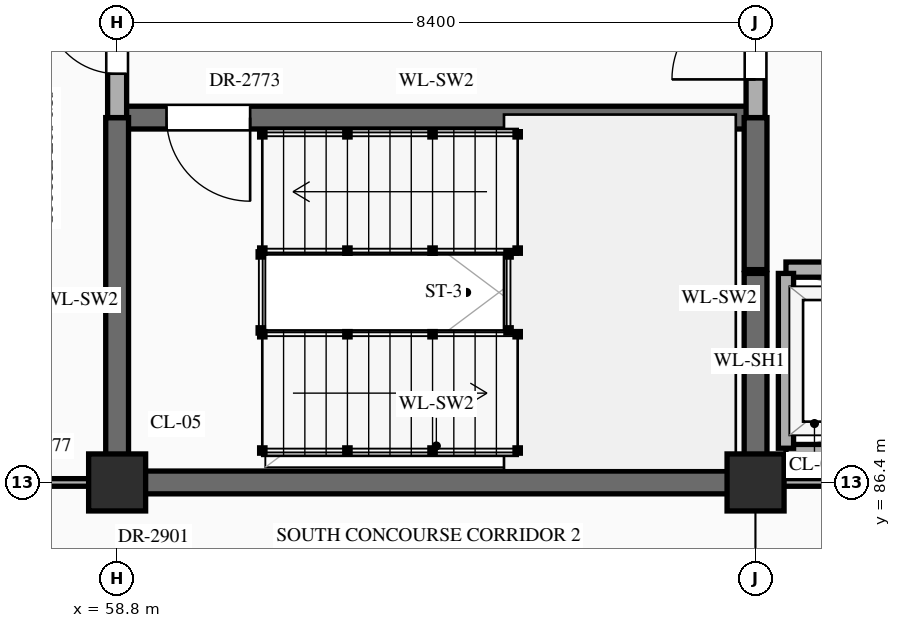
"""IFC4 building model, lengths in metres.
Left out: names, types, materials, properties, quantities, classifications, styles, units other than length and angle.
Written with IfcOpenShell. Run it as: python <this file> out.ifc"""

import sys

from ifc_helpers import new_model, si_unit, direction, frame, frame_2d, origin, origin_2d, place, context, subcontext, project, spatial, rectangle, extrude, element, fill, save


model = new_model("IFC4")
c1 = context("Model", 3, precision=1e-05, world=origin(), true_north=direction((0.0, 1.0)))
c2 = subcontext(c1, "Body", "Model", "MODEL_VIEW")
j1 = project(units=[si_unit("LENGTHUNIT", "METRE"), si_unit("PLANEANGLEUNIT", "RADIAN")], contexts=[c1])
p1 = place(None, origin())
s1 = spatial("IfcSite", under=j1, at=p1, CompositionType="ELEMENT")
p2 = place(p1, origin())
s2 = spatial("IfcBuilding", under=s1, at=p2, CompositionType="ELEMENT")
p3 = place(p2, frame((0.0, 0.0, 43.5)))
s3 = spatial("IfcBuildingStorey", under=s2, at=p3, CompositionType="ELEMENT", Elevation=43.5)
for number, where, z_axis, x_axis in (
    (1, (58.8, 86.4, 0.0), (0.0, 0.0, 1.0), (1.0, 0.0, 0.0)),
    (2, (67.2, 86.4, 0.0), (0.0, 0.0, 1.0), (1.0, 0.0, 0.0)),
):
    element("IfcColumn", number, at=place(p3, frame(where, z_axis=z_axis, x_axis=x_axis)), inside=s3, PredefinedType="COLUMN", context=c2, shape_type="SweptSolid", body=[
        extrude(rectangle(XDim=0.75, YDim=0.75, at=origin_2d()), origin(), (0.0, 0.0, 1.0), 4.2),
    ])
p4 = place(p3, frame((50.4, 86.4, 0.0), z_axis=(0.0, 0.0, 1.0), x_axis=(1.0, 0.0, 0.0)))
e3 = element("IfcWall", 3, at=p4, inside=s3, PredefinedType="STANDARD", context=c2, shape_type="SweptSolid", body=[
    extrude(rectangle(XDim=8.4, YDim=0.1, at=frame_2d((4.2, 0.0))), origin(), (0.0, 0.0, 1.0), 3.1),
])
p5 = place(p4, frame((0.907, 0.0, 0.0)))
e4 = element("IfcOpeningElement", 4, at=p5, cuts=e3, PredefinedType="OPENING", context=c2, shape_type="SweptSolid", body=[
    extrude(rectangle(XDim=1.28, YDim=2.35, at=frame_2d((0.64, 1.175))), frame((0.0, 0.062, 0.0), z_axis=(0.0, -1.0, 0.0), x_axis=(1.0, 0.0, 0.0)), (0.0, 0.0, 1.0), 0.124),
])
p6 = place(p4, frame((3.71, 0.0, 0.0)))
e5 = element("IfcOpeningElement", 5, at=p6, cuts=e3, PredefinedType="OPENING", context=c2, shape_type="SweptSolid", body=[
    extrude(rectangle(XDim=0.98, YDim=2.35, at=frame_2d((0.49, 1.175))), frame((0.0, 0.062, 0.0), z_axis=(0.0, -1.0, 0.0), x_axis=(1.0, 0.0, 0.0)), (0.0, 0.0, 1.0), 0.124),
])
p7 = place(p4, frame((6.343, 0.0, 0.0)))
e6 = element("IfcOpeningElement", 6, at=p7, cuts=e3, PredefinedType="OPENING", context=c2, shape_type="SweptSolid", body=[
    extrude(rectangle(XDim=1.02, YDim=2.4, at=frame_2d((0.51, 1.2))), frame((0.0, 0.062, 0.0), z_axis=(0.0, -1.0, 0.0), x_axis=(1.0, 0.0, 0.0)), (0.0, 0.0, 1.0), 0.124),
])
p8 = place(p3, frame((58.8, 86.4, 0.0), z_axis=(0.0, 0.0, 1.0), x_axis=(1.0, 0.0, 0.0)))
e7 = element("IfcWall", 7, at=p8, inside=s3, PredefinedType="SHEAR", context=c2, shape_type="SweptSolid", body=[
    extrude(rectangle(XDim=8.4, YDim=0.3, at=frame_2d((4.2, 0.0))), origin(), (0.0, 0.0, 1.0), 3.95),
])
p9 = place(p3, frame((67.25, 86.4, 0.0), z_axis=(0.0, 0.0, 1.0), x_axis=(1.0, 0.0, 0.0)))
e8 = element("IfcWall", 8, at=p9, inside=s3, PredefinedType="STANDARD", context=c2, shape_type="SweptSolid", body=[
    extrude(rectangle(XDim=8.3, YDim=0.1, at=frame_2d((4.15, 0.0))), origin(), (0.0, 0.0, 1.0), 3.1),
])
p10 = place(p3, frame((67.6, 86.8, 0.0), z_axis=(0.0, 0.0, 1.0), x_axis=(1.0, 0.0, 0.0)))
e9 = element("IfcWall", 9, at=p10, inside=s3, PredefinedType="STANDARD", context=c2, shape_type="SweptSolid", body=[
    extrude(rectangle(XDim=2.5, YDim=0.2, at=frame_2d((1.25, 0.0))), origin(), (0.0, 0.0, 1.0), 3.95),
])
p11 = place(p3, frame((67.6, 89.2, 0.0), z_axis=(0.0, 0.0, 1.0), x_axis=(1.0, 0.0, 0.0)))
e10 = element("IfcWall", 10, at=p11, inside=s3, PredefinedType="STANDARD", context=c2, shape_type="SweptSolid", body=[
    extrude(rectangle(XDim=7.7, YDim=0.2, at=frame_2d((3.85, 0.0))), origin(), (0.0, 0.0, 1.0), 3.95),
])
p12 = place(p11, frame((0.725, 0.0, 0.0)))
e11 = element("IfcOpeningElement", 11, at=p12, cuts=e10, PredefinedType="OPENING", context=c2, shape_type="SweptSolid", body=[
    extrude(rectangle(XDim=1.1, YDim=2.15, at=frame_2d((0.55, 1.075))), frame((0.0, 0.112, 0.0), z_axis=(0.0, -1.0, 0.0), x_axis=(1.0, 0.0, 0.0)), (0.0, 0.0, 1.0), 0.224),
])
p13 = place(p11, frame((3.3, 0.0, 0.0)))
e12 = element("IfcOpeningElement", 12, at=p13, cuts=e10, PredefinedType="OPENING", context=c2, shape_type="SweptSolid", body=[
    extrude(rectangle(XDim=1.1, YDim=2.15, at=frame_2d((0.55, 1.075))), frame((0.0, 0.112, 0.0), z_axis=(0.0, -1.0, 0.0), x_axis=(1.0, 0.0, 0.0)), (0.0, 0.0, 1.0), 0.224),
])
p14 = place(p11, frame((5.875, 0.0, 0.0)))
e13 = element("IfcOpeningElement", 13, at=p14, cuts=e10, PredefinedType="OPENING", context=c2, shape_type="SweptSolid", body=[
    extrude(rectangle(XDim=1.1, YDim=2.15, at=frame_2d((0.55, 1.075))), frame((0.0, 0.112, 0.0), z_axis=(0.0, -1.0, 0.0), x_axis=(1.0, 0.0, 0.0)), (0.0, 0.0, 1.0), 0.224),
])
p15 = place(p3, frame((58.8, 91.2, 0.0), z_axis=(0.0, 0.0, 1.0), x_axis=(1.0, 0.0, 0.0)))
e14 = element("IfcWall", 14, at=p15, inside=s3, PredefinedType="SHEAR", context=c2, shape_type="SweptSolid", body=[
    extrude(rectangle(XDim=8.4, YDim=0.3, at=frame_2d((4.2, 0.0))), origin(), (0.0, 0.0, 1.0), 3.95),
])
p16 = place(p15, frame((0.65, 0.0, 0.0)))
e15 = element("IfcOpeningElement", 15, at=p16, cuts=e14, PredefinedType="OPENING", context=c2, shape_type="SweptSolid", body=[
    extrude(rectangle(XDim=1.1, YDim=2.2, at=frame_2d((0.55, 1.1))), frame((0.0, 0.162, 0.0), z_axis=(0.0, -1.0, 0.0), x_axis=(1.0, 0.0, 0.0)), (0.0, 0.0, 1.0), 0.324),
])
p17 = place(p3, frame((58.8, 86.4, 0.0), z_axis=(0.0, 0.0, 1.0), x_axis=(0.0, 1.0, 0.0)))
e16 = element("IfcWall", 16, at=p17, inside=s3, PredefinedType="SHEAR", context=c2, shape_type="SweptSolid", body=[
    extrude(rectangle(XDim=4.8, YDim=0.3, at=frame_2d((2.4, 0.0))), origin(), (0.0, 0.0, 1.0), 3.95),
])
p18 = place(p3, frame((58.8, 91.2, 0.0), z_axis=(0.0, 0.0, 1.0), x_axis=(0.0, 1.0, 0.0)))
e17 = element("IfcWall", 17, at=p18, inside=s3, PredefinedType="STANDARD", context=c2, shape_type="SweptSolid", body=[
    extrude(rectangle(XDim=2.4, YDim=0.25, at=frame_2d((1.2, 0.0))), origin(), (0.0, 0.0, 1.0), 3.2),
])
p19 = place(p18, frame((0.577, 0.0, 0.0)))
e18 = element("IfcOpeningElement", 18, at=p19, cuts=e17, PredefinedType="OPENING", context=c2, shape_type="SweptSolid", body=[
    extrude(rectangle(XDim=0.95, YDim=2.15, at=frame_2d((0.475, 1.075))), frame((0.0, 0.137, 0.0), z_axis=(0.0, -1.0, 0.0), x_axis=(1.0, 0.0, 0.0)), (0.0, 0.0, 1.0), 0.274),
])
p20 = place(p3, frame((67.2, 86.45, 0.0), z_axis=(0.0, 0.0, 1.0), x_axis=(0.0, 1.0, 0.0)))
e19 = element("IfcWall", 19, at=p20, inside=s3, PredefinedType="SHEAR", context=c2, shape_type="SweptSolid", body=[
    extrude(rectangle(XDim=2.7, YDim=0.3, at=frame_2d((1.35, 0.0))), origin(), (0.0, 0.0, 1.0), 3.95),
])
p21 = place(p3, frame((67.2, 89.2, 0.0), z_axis=(0.0, 0.0, 1.0), x_axis=(0.0, 1.0, 0.0)))
e20 = element("IfcWall", 20, at=p21, inside=s3, PredefinedType="SHEAR", context=c2, shape_type="SweptSolid", body=[
    extrude(rectangle(XDim=2.0, YDim=0.3, at=frame_2d((1.0, 0.0))), origin(), (0.0, 0.0, 1.0), 3.95),
])
p22 = place(p3, frame((67.2, 91.2, 0.0), z_axis=(0.0, 0.0, 1.0), x_axis=(0.0, 1.0, 0.0)))
e21 = element("IfcWall", 21, at=p22, inside=s3, PredefinedType="STANDARD", context=c2, shape_type="SweptSolid", body=[
    extrude(rectangle(XDim=2.4, YDim=0.25, at=frame_2d((1.2, 0.0))), origin(), (0.0, 0.0, 1.0), 3.2),
])
p23 = place(p22, frame((0.502, 0.0, 0.0)))
e22 = element("IfcOpeningElement", 22, at=p23, cuts=e21, PredefinedType="OPENING", context=c2, shape_type="SweptSolid", body=[
    extrude(rectangle(XDim=1.1, YDim=2.2, at=frame_2d((0.55, 1.1))), frame((0.0, 0.137, 0.0), z_axis=(0.0, -1.0, 0.0), x_axis=(1.0, 0.0, 0.0)), (0.0, 0.0, 1.0), 0.274),
])
p24 = place(p3, frame((67.6, 86.85, 0.0), z_axis=(0.0, 0.0, 1.0), x_axis=(0.0, 1.0, 0.0)))
e23 = element("IfcWall", 23, at=p24, inside=s3, PredefinedType="STANDARD", context=c2, shape_type="SweptSolid", body=[
    extrude(rectangle(XDim=2.3, YDim=0.2, at=frame_2d((1.15, 0.0))), origin(), (0.0, 0.0, 1.0), 3.95),
])
p25 = place(p16, frame((1.1, 0.0, 0.0), z_axis=(0.0, 0.0, 1.0), x_axis=(-1.0, 0.0, 0.0)))
e24 = element("IfcDoor", 24, at=p25, inside=s3, OperationType="SINGLE_SWING_LEFT", PredefinedType="DOOR", context=c2, shape_type="SweptSolid", body=[
    extrude(rectangle(XDim=1.1, YDim=2.2, at=frame_2d((0.55, 1.1))), frame((0.0, 0.025, 0.0), z_axis=(0.0, -1.0, 0.0), x_axis=(1.0, 0.0, 0.0)), (0.0, 0.0, 1.0), 0.05),
])
fill(e15, e24)
p26 = place(p23, origin())
e25 = element("IfcDoor", 25, at=p26, inside=s3, OperationType="SINGLE_SWING_LEFT", PredefinedType="DOOR", context=c2, shape_type="SweptSolid", body=[
    extrude(rectangle(XDim=1.1, YDim=2.2, at=frame_2d((0.55, 1.1))), frame((0.0, 0.025, 0.0), z_axis=(0.0, -1.0, 0.0), x_axis=(1.0, 0.0, 0.0)), (0.0, 0.0, 1.0), 0.05),
])
fill(e22, e25)
p27 = place(p19, origin())
e26 = element("IfcDoor", 26, at=p27, inside=s3, OperationType="SINGLE_SWING_RIGHT", PredefinedType="DOOR", context=c2, shape_type="SweptSolid", body=[
    extrude(rectangle(XDim=0.95, YDim=2.15, at=frame_2d((0.475, 1.075))), frame((0.0, 0.025, 0.0), z_axis=(0.0, -1.0, 0.0), x_axis=(1.0, 0.0, 0.0)), (0.0, 0.0, 1.0), 0.05),
])
fill(e18, e26)
save(model, sys.argv[1])
